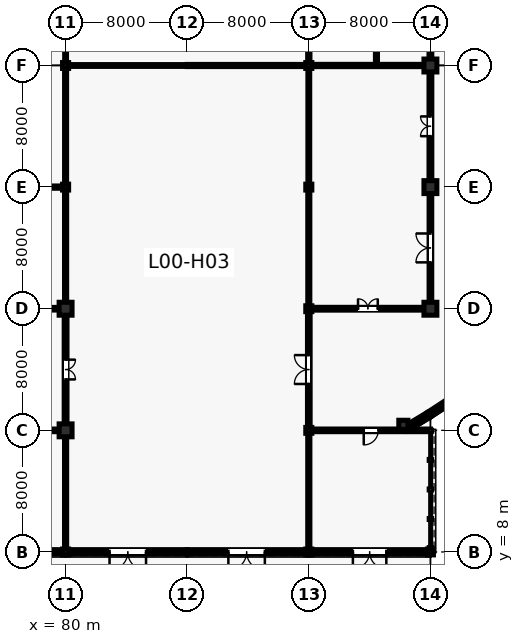
"""IFC4 building model, lengths in metres.
Left out: names, types, materials, properties, quantities, classifications, styles, units other than length and angle.
Written with IfcOpenShell. Run it as: python <this file> out.ifc"""

import sys

from ifc_helpers import new_model, si_unit, direction, frame, frame_2d, origin, origin_2d, place, context, subcontext, project, spatial, rectangle, i_section, extrude, element, fill, save


model = new_model("IFC4")
c1 = context("Model", 3, precision=1e-05, world=origin(), true_north=direction((0.0, 1.0)))
c2 = subcontext(c1, "Body", "Model", "MODEL_VIEW")
j1 = project(units=[si_unit("LENGTHUNIT", "METRE"), si_unit("PLANEANGLEUNIT", "RADIAN")], contexts=[c1])
p1 = place(None, origin())
s1 = spatial("IfcSite", under=j1, at=p1, CompositionType="ELEMENT")
p2 = place(p1, origin())
s2 = spatial("IfcBuilding", under=s1, at=p2, CompositionType="ELEMENT")
p3 = place(p2, origin())
s3 = spatial("IfcBuildingStorey", under=s2, at=p3, CompositionType="ELEMENT", Elevation=0.0)
p4 = place(p3, frame((80.0, 8.0, 0.0), z_axis=(0.0, 0.0, 1.0), x_axis=(1.0, 0.0, 0.0)))
e1 = element("IfcColumn", 1, at=p4, inside=s3, PredefinedType="COLUMN", context=c2, shape_type="SweptSolid", body=[
    extrude(i_section(OverallWidth=0.398, OverallDepth=0.387, WebThickness=0.021, FlangeThickness=0.033, FilletRadius=0.015, at=origin_2d()), origin(), (0.0, 0.0, 1.0), 5.28),
])
for number, where, z_axis, x_axis in (
    (2, (80.0, 16.0, 0.0), (0.0, 0.0, 1.0), (1.0, 0.0, 0.0)),
    (3, (80.0, 24.0, 0.0), (0.0, 0.0, 1.0), (1.0, 0.0, 0.0)),
):
    element("IfcColumn", number, at=place(p3, frame(where, z_axis=z_axis, x_axis=x_axis)), inside=s3, PredefinedType="COLUMN", context=c2, shape_type="SweptSolid", body=[
        extrude(rectangle(XDim=0.85, YDim=0.85, at=origin_2d()), origin(), (0.0, 0.0, 1.0), 5.28),
    ])
for number, where, z_axis, x_axis in (
    (4, (80.0, 32.0, 0.0), (0.0, 0.0, 1.0), (1.0, 0.0, 0.0)),
    (5, (80.0, 40.0, 0.0), (0.0, 0.0, 1.0), (1.0, 0.0, 0.0)),
    (6, (96.0, 8.0, 0.0), (0.0, 0.0, 1.0), (1.0, 0.0, 0.0)),
    (7, (96.0, 16.0, 0.0), (0.0, 0.0, 1.0), (1.0, 0.0, 0.0)),
    (8, (96.0, 24.0, 0.0), (0.0, 0.0, 1.0), (1.0, 0.0, 0.0)),
    (9, (96.0, 32.0, 0.0), (0.0, 0.0, 1.0), (1.0, 0.0, 0.0)),
    (10, (96.0, 40.0, 0.0), (0.0, 0.0, 1.0), (1.0, 0.0, 0.0)),
    (11, (104.0, 8.0, 0.0), (0.0, 0.0, 1.0), (1.0, 0.0, 0.0)),
):
    element("IfcColumn", number, at=place(p3, frame(where, z_axis=z_axis, x_axis=x_axis)), inside=s3, PredefinedType="COLUMN", context=c2, shape_type="SweptSolid", body=[
        extrude(i_section(OverallWidth=0.398, OverallDepth=0.387, WebThickness=0.021, FlangeThickness=0.033, FilletRadius=0.015, at=origin_2d()), origin(), (0.0, 0.0, 1.0), 5.28),
    ])
for number, where, z_axis, x_axis in (
    (12, (104.0, 24.0, 0.0), (0.0, 0.0, 1.0), (1.0, 0.0, 0.0)),
    (13, (104.0, 32.0, 0.0), (0.0, 0.0, 1.0), (1.0, 0.0, 0.0)),
    (14, (104.0, 40.0, 0.0), (0.0, 0.0, 1.0), (1.0, 0.0, 0.0)),
):
    element("IfcColumn", number, at=place(p3, frame(where, z_axis=z_axis, x_axis=x_axis)), inside=s3, PredefinedType="COLUMN", context=c2, shape_type="SweptSolid", body=[
        extrude(rectangle(XDim=0.85, YDim=0.85, at=origin_2d()), origin(), (0.0, 0.0, 1.0), 5.28),
    ])
p5 = place(p3, frame((102.221, 16.364, 0.0), z_axis=(0.0, 0.0, 1.0), x_axis=(1.0, 0.0, 0.0)))
e15 = element("IfcColumn", 15, at=p5, inside=s3, PredefinedType="COLUMN", context=c2, shape_type="SweptSolid", body=[
    extrude(rectangle(XDim=0.6, YDim=0.6, at=origin_2d()), origin(), (0.0, 0.0, 1.0), 5.28),
])
p6 = place(p3, frame((102.351, 16.133, 0.0), z_axis=(0.0, 0.0, 1.0), x_axis=(0.856543302071, 0.51607516088, 0.0)))
e16 = element("IfcWall", 16, at=p6, inside=s3, PredefinedType="SOLIDWALL", context=c2, shape_type="SweptSolid", body=[
    extrude(rectangle(XDim=1.795, YDim=0.305, at=frame_2d((0.897, 0.0))), origin(), (0.0, 0.0, 1.0), 5.035),
])
p7 = place(p3, frame((103.883, 17.056, 0.0), z_axis=(0.0, 0.0, 1.0), x_axis=(0.836686786408, 0.547681678944, 0.0)))
e17 = element("IfcWall", 17, at=p7, inside=s3, PredefinedType="SOLIDWALL", context=c2, shape_type="SweptSolid", body=[
    extrude(rectangle(XDim=1.795, YDim=0.305, at=frame_2d((0.897, 0.0))), origin(), (0.0, 0.0, 1.0), 5.035),
])
p8 = place(p7, frame((0.347, 0.0, 0.9)))
e18 = element("IfcOpeningElement", 18, at=p8, cuts=e17, PredefinedType="OPENING", context=c2, shape_type="SweptSolid", body=[
    extrude(rectangle(XDim=1.1, YDim=2.1, at=frame_2d((0.55, 1.05))), frame((0.0, 0.162, 0.0), z_axis=(0.0, -1.0, 0.0), x_axis=(1.0, 0.0, 0.0)), (0.0, 0.0, 1.0), 0.325),
])
p9 = place(p3, frame((72.184, 8.0, 0.0), z_axis=(0.0, 0.0, 1.0), x_axis=(1.0, 0.0, 0.0)))
e19 = element("IfcWall", 19, at=p9, inside=s3, PredefinedType="SOLIDWALL", context=c2, shape_type="SweptSolid", body=[
    extrude(rectangle(XDim=7.632, YDim=0.305, at=frame_2d((3.816, 0.0))), origin(), (0.0, 0.0, 1.0), 4.619),
])
p10 = place(p9, frame((2.716, 0.0, 0.0)))
e20 = element("IfcOpeningElement", 20, at=p10, cuts=e19, PredefinedType="OPENING", context=c2, shape_type="SweptSolid", body=[
    extrude(rectangle(XDim=2.2, YDim=2.5, at=frame_2d((1.1, 1.25))), frame((0.0, 0.162, 0.0), z_axis=(0.0, -1.0, 0.0), x_axis=(1.0, 0.0, 0.0)), (0.0, 0.0, 1.0), 0.325),
])
p11 = place(p3, frame((80.184, 8.0, 0.0), z_axis=(0.0, 0.0, 1.0), x_axis=(1.0, 0.0, 0.0)))
e21 = element("IfcWall", 21, at=p11, inside=s3, PredefinedType="SOLIDWALL", context=c2, shape_type="SweptSolid", body=[
    extrude(rectangle(XDim=7.816, YDim=0.305, at=frame_2d((3.908, 0.0))), origin(), (0.0, 0.0, 1.0), 4.274),
])
p12 = place(p11, frame((2.708, 0.0, 0.0)))
e22 = element("IfcOpeningElement", 22, at=p12, cuts=e21, PredefinedType="OPENING", context=c2, shape_type="SweptSolid", body=[
    extrude(rectangle(XDim=2.4, YDim=2.7, at=frame_2d((1.2, 1.35))), frame((0.0, 0.162, 0.0), z_axis=(0.0, -1.0, 0.0), x_axis=(1.0, 0.0, 0.0)), (0.0, 0.0, 1.0), 0.325),
])
p13 = place(p3, frame((88.0, 8.0, 0.0), z_axis=(0.0, 0.0, 1.0), x_axis=(1.0, 0.0, 0.0)))
e23 = element("IfcWall", 23, at=p13, inside=s3, PredefinedType="SOLIDWALL", context=c2, shape_type="SweptSolid", body=[
    extrude(rectangle(XDim=7.816, YDim=0.305, at=frame_2d((3.908, 0.0))), origin(), (0.0, 0.0, 1.0), 4.274),
])
p14 = place(p13, frame((2.708, 0.0, 0.0)))
e24 = element("IfcOpeningElement", 24, at=p14, cuts=e23, PredefinedType="OPENING", context=c2, shape_type="SweptSolid", body=[
    extrude(rectangle(XDim=2.4, YDim=2.7, at=frame_2d((1.2, 1.35))), frame((0.0, 0.162, 0.0), z_axis=(0.0, -1.0, 0.0), x_axis=(1.0, 0.0, 0.0)), (0.0, 0.0, 1.0), 0.325),
])
p15 = place(p3, frame((96.184, 8.0, 0.0), z_axis=(0.0, 0.0, 1.0), x_axis=(1.0, 0.0, 0.0)))
e25 = element("IfcWall", 25, at=p15, inside=s3, PredefinedType="SOLIDWALL", context=c2, shape_type="SweptSolid", body=[
    extrude(rectangle(XDim=7.632, YDim=0.305, at=frame_2d((3.816, 0.0))), origin(), (0.0, 0.0, 1.0), 4.679),
])
p16 = place(p15, frame((2.716, 0.0, 0.0)))
e26 = element("IfcOpeningElement", 26, at=p16, cuts=e25, PredefinedType="OPENING", context=c2, shape_type="SweptSolid", body=[
    extrude(rectangle(XDim=2.2, YDim=2.5, at=frame_2d((1.1, 1.25))), frame((0.0, 0.162, 0.0), z_axis=(0.0, -1.0, 0.0), x_axis=(1.0, 0.0, 0.0)), (0.0, 0.0, 1.0), 0.325),
])
p17 = place(p3, frame((80.0, 8.184, 0.0), z_axis=(0.0, 0.0, 1.0), x_axis=(0.0, 1.0, 0.0)))
e27 = element("IfcWall", 27, at=p17, inside=s3, PredefinedType="PARTITIONING", context=c2, shape_type="SweptSolid", body=[
    extrude(rectangle(XDim=7.401, YDim=0.142, at=frame_2d((3.701, 0.0))), origin(), (0.0, 0.0, 1.0), 5.025),
])
p18 = place(p3, frame((72.0, 16.0, 0.0), z_axis=(0.0, 0.0, 1.0), x_axis=(1.0, 0.0, 0.0)))
e28 = element("IfcWall", 28, at=p18, inside=s3, PredefinedType="PARTITIONING", context=c2, shape_type="SweptSolid", body=[
    extrude(rectangle(XDim=7.585, YDim=0.175, at=frame_2d((3.792, 0.0))), origin(), (0.0, 0.0, 1.0), 5.025),
])
p19 = place(p18, frame((3.268, 0.0, 0.0)))
e29 = element("IfcOpeningElement", 29, at=p19, cuts=e28, PredefinedType="OPENING", context=c2, shape_type="SweptSolid", body=[
    extrude(rectangle(XDim=1.05, YDim=2.15, at=frame_2d((0.525, 1.075))), frame((0.0, 0.097, 0.0), z_axis=(0.0, -1.0, 0.0), x_axis=(1.0, 0.0, 0.0)), (0.0, 0.0, 1.0), 0.195),
])
p20 = place(p3, frame((80.0, 16.415, 0.0), z_axis=(0.0, 0.0, 1.0), x_axis=(0.0, 1.0, 0.0)))
e30 = element("IfcWall", 30, at=p20, inside=s3, PredefinedType="PARTITIONING", context=c2, shape_type="SweptSolid", body=[
    extrude(rectangle(XDim=7.17, YDim=0.185, at=frame_2d((3.585, 0.0))), origin(), (0.0, 0.0, 1.0), 4.603),
])
p21 = place(p20, frame((2.935, 0.0, 0.0)))
e31 = element("IfcOpeningElement", 31, at=p21, cuts=e30, PredefinedType="OPENING", context=c2, shape_type="SweptSolid", body=[
    extrude(rectangle(XDim=1.3, YDim=2.2, at=frame_2d((0.65, 1.1))), frame((0.0, 0.103, 0.0), z_axis=(0.0, -1.0, 0.0), x_axis=(1.0, 0.0, 0.0)), (0.0, 0.0, 1.0), 0.205),
])
p22 = place(p3, frame((72.415, 24.0, 0.0), z_axis=(0.0, 0.0, 1.0), x_axis=(1.0, 0.0, 0.0)))
e32 = element("IfcWall", 32, at=p22, inside=s3, PredefinedType="PARTITIONING", context=c2, shape_type="SweptSolid", body=[
    extrude(rectangle(XDim=7.17, YDim=0.175, at=frame_2d((3.585, 0.0))), origin(), (0.0, 0.0, 1.0), 4.327),
])
p23 = place(p3, frame((80.0, 24.415, 0.0), z_axis=(0.0, 0.0, 1.0), x_axis=(0.0, 1.0, 0.0)))
e33 = element("IfcWall", 33, at=p23, inside=s3, PredefinedType="PARTITIONING", context=c2, shape_type="SweptSolid", body=[
    extrude(rectangle(XDim=7.401, YDim=0.142, at=frame_2d((3.701, 0.0))), origin(), (0.0, 0.0, 1.0), 4.667),
])
p24 = place(p3, frame((72.415, 32.0, 0.0), z_axis=(0.0, 0.0, 1.0), x_axis=(1.0, 0.0, 0.0)))
e34 = element("IfcWall", 34, at=p24, inside=s3, PredefinedType="PARTITIONING", context=c2, shape_type="SweptSolid", body=[
    extrude(rectangle(XDim=7.396, YDim=0.15, at=frame_2d((3.698, 0.0))), origin(), (0.0, 0.0, 1.0), 4.403),
])
p25 = place(p3, frame((80.0, 32.184, 0.0), z_axis=(0.0, 0.0, 1.0), x_axis=(0.0, 1.0, 0.0)))
e35 = element("IfcWall", 35, at=p25, inside=s3, PredefinedType="PARTITIONING", context=c2, shape_type="SweptSolid", body=[
    extrude(rectangle(XDim=7.633, YDim=0.135, at=frame_2d((3.816, 0.0))), origin(), (0.0, 0.0, 1.0), 4.607),
])
p26 = place(p3, frame((80.0, 40.184, 0.0), z_axis=(0.0, 0.0, 1.0), x_axis=(0.0, 1.0, 0.0)))
e36 = element("IfcWall", 36, at=p26, inside=s3, PredefinedType="PARTITIONING", context=c2, shape_type="SweptSolid", body=[
    extrude(rectangle(XDim=7.633, YDim=0.12, at=frame_2d((3.816, 0.0))), origin(), (0.0, 0.0, 1.0), 4.471),
])
p27 = place(p3, frame((80.189, 40.0, 0.0), z_axis=(0.0, 0.0, 1.0), x_axis=(1.0, 0.0, 0.0)))
e37 = element("IfcWall", 37, at=p27, inside=s3, PredefinedType="PARTITIONING", context=c2, shape_type="SweptSolid", body=[
    extrude(rectangle(XDim=7.811, YDim=0.12, at=frame_2d((3.906, 0.0))), origin(), (0.0, 0.0, 1.0), 4.262),
])
p28 = place(p3, frame((96.0, 8.184, 0.0), z_axis=(0.0, 0.0, 1.0), x_axis=(0.0, 1.0, 0.0)))
e38 = element("IfcWall", 38, at=p28, inside=s3, PredefinedType="PARTITIONING", context=c2, shape_type="SweptSolid", body=[
    extrude(rectangle(XDim=7.633, YDim=0.142, at=frame_2d((3.816, 0.0))), origin(), (0.0, 0.0, 1.0), 5.025),
])
p29 = place(p3, frame((96.0, 16.184, 0.0), z_axis=(0.0, 0.0, 1.0), x_axis=(0.0, 1.0, 0.0)))
e39 = element("IfcWall", 39, at=p29, inside=s3, PredefinedType="PARTITIONING", context=c2, shape_type="SweptSolid", body=[
    extrude(rectangle(XDim=7.633, YDim=0.175, at=frame_2d((3.816, 0.0))), origin(), (0.0, 0.0, 1.0), 4.607),
])
p30 = place(p29, frame((2.866, 0.0, 0.0)))
e40 = element("IfcOpeningElement", 40, at=p30, cuts=e39, PredefinedType="OPENING", context=c2, shape_type="SweptSolid", body=[
    extrude(rectangle(XDim=1.9, YDim=2.38, at=frame_2d((0.95, 1.19))), frame((0.0, 0.097, 0.0), z_axis=(0.0, -1.0, 0.0), x_axis=(1.0, 0.0, 0.0)), (0.0, 0.0, 1.0), 0.195),
])
p31 = place(p3, frame((96.0, 24.184, 0.0), z_axis=(0.0, 0.0, 1.0), x_axis=(0.0, 1.0, 0.0)))
e41 = element("IfcWall", 41, at=p31, inside=s3, PredefinedType="PARTITIONING", context=c2, shape_type="SweptSolid", body=[
    extrude(rectangle(XDim=7.633, YDim=0.135, at=frame_2d((3.816, 0.0))), origin(), (0.0, 0.0, 1.0), 4.67),
])
p32 = place(p3, frame((96.0, 32.184, 0.0), z_axis=(0.0, 0.0, 1.0), x_axis=(0.0, 1.0, 0.0)))
e42 = element("IfcWall", 42, at=p32, inside=s3, PredefinedType="PARTITIONING", context=c2, shape_type="SweptSolid", body=[
    extrude(rectangle(XDim=7.633, YDim=0.12, at=frame_2d((3.816, 0.0))), origin(), (0.0, 0.0, 1.0), 4.603),
])
p33 = place(p3, frame((88.0, 40.0, 0.0), z_axis=(0.0, 0.0, 1.0), x_axis=(1.0, 0.0, 0.0)))
e43 = element("IfcWall", 43, at=p33, inside=s3, PredefinedType="PARTITIONING", context=c2, shape_type="SweptSolid", body=[
    extrude(rectangle(XDim=7.811, YDim=0.142, at=frame_2d((3.906, 0.0))), origin(), (0.0, 0.0, 1.0), 4.262),
])
p34 = place(p3, frame((96.0, 40.184, 0.0), z_axis=(0.0, 0.0, 1.0), x_axis=(0.0, 1.0, 0.0)))
e44 = element("IfcWall", 44, at=p34, inside=s3, PredefinedType="PARTITIONING", context=c2, shape_type="SweptSolid", body=[
    extrude(rectangle(XDim=7.633, YDim=0.15, at=frame_2d((3.816, 0.0))), origin(), (0.0, 0.0, 1.0), 4.412),
])
p35 = place(p3, frame((96.189, 16.0, 0.0), z_axis=(0.0, 0.0, 1.0), x_axis=(1.0, 0.0, 0.0)))
e45 = element("IfcWall", 45, at=p35, inside=s3, PredefinedType="PARTITIONING", context=c2, shape_type="SweptSolid", body=[
    extrude(rectangle(XDim=7.811, YDim=0.175, at=frame_2d((3.906, 0.0))), origin(), (0.0, 0.0, 1.0), 5.025),
])
p36 = place(p35, frame((3.426, 0.0, 0.0)))
e46 = element("IfcOpeningElement", 46, at=p36, cuts=e45, PredefinedType="OPENING", context=c2, shape_type="SweptSolid", body=[
    extrude(rectangle(XDim=0.96, YDim=2.14, at=frame_2d((0.48, 1.07))), frame((0.0, 0.097, 0.0), z_axis=(0.0, -1.0, 0.0), x_axis=(1.0, 0.0, 0.0)), (0.0, 0.0, 1.0), 0.195),
])
p37 = place(p3, frame((96.189, 24.0, 0.0), z_axis=(0.0, 0.0, 1.0), x_axis=(1.0, 0.0, 0.0)))
e47 = element("IfcWall", 47, at=p37, inside=s3, PredefinedType="PARTITIONING", context=c2, shape_type="SweptSolid", body=[
    extrude(rectangle(XDim=7.396, YDim=0.185, at=frame_2d((3.698, 0.0))), origin(), (0.0, 0.0, 1.0), 4.404),
])
p38 = place(p37, frame((3.048, 0.0, 0.0)))
e48 = element("IfcOpeningElement", 48, at=p38, cuts=e47, PredefinedType="OPENING", context=c2, shape_type="SweptSolid", body=[
    extrude(rectangle(XDim=1.3, YDim=2.2, at=frame_2d((0.65, 1.1))), frame((0.0, 0.103, 0.0), z_axis=(0.0, -1.0, 0.0), x_axis=(1.0, 0.0, 0.0)), (0.0, 0.0, 1.0), 0.205),
])
p39 = place(p3, frame((104.0, 24.415, 0.0), z_axis=(0.0, 0.0, 1.0), x_axis=(0.0, 1.0, 0.0)))
e49 = element("IfcWall", 49, at=p39, inside=s3, PredefinedType="PARTITIONING", context=c2, shape_type="SweptSolid", body=[
    extrude(rectangle(XDim=7.17, YDim=0.175, at=frame_2d((3.585, 0.0))), origin(), (0.0, 0.0, 1.0), 4.403),
])
p40 = place(p39, frame((2.635, 0.0, 0.0)))
e50 = element("IfcOpeningElement", 50, at=p40, cuts=e49, PredefinedType="OPENING", context=c2, shape_type="SweptSolid", body=[
    extrude(rectangle(XDim=1.9, YDim=2.38, at=frame_2d((0.95, 1.19))), frame((0.0, 0.097, 0.0), z_axis=(0.0, -1.0, 0.0), x_axis=(1.0, 0.0, 0.0)), (0.0, 0.0, 1.0), 0.195),
])
p41 = place(p3, frame((104.0, 32.415, 0.0), z_axis=(0.0, 0.0, 1.0), x_axis=(0.0, 1.0, 0.0)))
e51 = element("IfcWall", 51, at=p41, inside=s3, PredefinedType="PARTITIONING", context=c2, shape_type="SweptSolid", body=[
    extrude(rectangle(XDim=7.17, YDim=0.185, at=frame_2d((3.585, 0.0))), origin(), (0.0, 0.0, 1.0), 4.412),
])
p42 = place(p41, frame((2.935, 0.0, 0.0)))
e52 = element("IfcOpeningElement", 52, at=p42, cuts=e51, PredefinedType="OPENING", context=c2, shape_type="SweptSolid", body=[
    extrude(rectangle(XDim=1.3, YDim=2.2, at=frame_2d((0.65, 1.1))), frame((0.0, 0.103, 0.0), z_axis=(0.0, -1.0, 0.0), x_axis=(1.0, 0.0, 0.0)), (0.0, 0.0, 1.0), 0.205),
])
p43 = place(p3, frame((96.189, 40.0, 0.0), z_axis=(0.0, 0.0, 1.0), x_axis=(1.0, 0.0, 0.0)))
e53 = element("IfcWall", 53, at=p43, inside=s3, PredefinedType="PARTITIONING", context=c2, shape_type="SweptSolid", body=[
    extrude(rectangle(XDim=7.396, YDim=0.15, at=frame_2d((3.698, 0.0))), origin(), (0.0, 0.0, 1.0), 4.403),
])
p44 = place(p3, frame((104.0, 40.415, 0.0), z_axis=(0.0, 0.0, 1.0), x_axis=(0.0, 1.0, 0.0)))
e54 = element("IfcWall", 54, at=p44, inside=s3, PredefinedType="PARTITIONING", context=c2, shape_type="SweptSolid", body=[
    extrude(rectangle(XDim=7.17, YDim=0.185, at=frame_2d((3.585, 0.0))), origin(), (0.0, 0.0, 1.0), 4.404),
])
p45 = place(p44, frame((3.085, 0.0, 0.0)))
e55 = element("IfcOpeningElement", 55, at=p45, cuts=e54, PredefinedType="OPENING", context=c2, shape_type="SweptSolid", body=[
    extrude(rectangle(XDim=1.0, YDim=2.15, at=frame_2d((0.5, 1.075))), frame((0.0, 0.103, 0.0), z_axis=(0.0, -1.0, 0.0), x_axis=(1.0, 0.0, 0.0)), (0.0, 0.0, 1.0), 0.205),
])
p46 = place(p3, frame((100.45, 40.02, 0.0), z_axis=(0.0, 0.0, 1.0), x_axis=(0.0, 1.0, 0.0)))
e56 = element("IfcWall", 56, at=p46, inside=s3, PredefinedType="PARTITIONING", context=c2, shape_type="SweptSolid", body=[
    extrude(rectangle(XDim=7.96, YDim=0.135, at=frame_2d((3.98, 0.0))), origin(), (0.0, 0.0, 1.0), 4.336),
])
p47 = place(p46, frame((3.49, 0.0, 0.0)))
e57 = element("IfcOpeningElement", 57, at=p47, cuts=e56, PredefinedType="OPENING", context=c2, shape_type="SweptSolid", body=[
    extrude(rectangle(XDim=0.98, YDim=2.15, at=frame_2d((0.49, 1.075))), frame((0.0, 0.077, 0.0), z_axis=(0.0, -1.0, 0.0), x_axis=(1.0, 0.0, 0.0)), (0.0, 0.0, 1.0), 0.155),
])
p48 = place(p8, origin())
e58 = element("IfcWindow", 58, at=p48, inside=s3, PartitioningType="SINGLE_PANEL", PredefinedType="WINDOW", context=c2, shape_type="SweptSolid", body=[
    extrude(rectangle(XDim=1.1, YDim=2.1, at=frame_2d((0.55, 1.05))), frame((0.0, 0.03, 0.0), z_axis=(0.0, -1.0, 0.0), x_axis=(1.0, 0.0, 0.0)), (0.0, 0.0, 1.0), 0.06),
])
fill(e18, e58)
p49 = place(p12, frame((2.4, 0.0, 0.0), z_axis=(0.0, 0.0, 1.0), x_axis=(-1.0, 0.0, 0.0)))
e59 = element("IfcDoor", 59, at=p49, inside=s3, OperationType="DOUBLE_DOOR_SINGLE_SWING", PredefinedType="DOOR", context=c2, shape_type="SweptSolid", body=[
    extrude(rectangle(XDim=2.4, YDim=2.7, at=frame_2d((1.2, 1.35))), frame((0.0, 0.025, 0.0), z_axis=(0.0, -1.0, 0.0), x_axis=(1.0, 0.0, 0.0)), (0.0, 0.0, 1.0), 0.05),
])
fill(e22, e59)
p50 = place(p14, frame((2.4, 0.0, 0.0), z_axis=(0.0, 0.0, 1.0), x_axis=(-1.0, 0.0, 0.0)))
e60 = element("IfcDoor", 60, at=p50, inside=s3, OperationType="DOUBLE_DOOR_SINGLE_SWING", PredefinedType="DOOR", context=c2, shape_type="SweptSolid", body=[
    extrude(rectangle(XDim=2.4, YDim=2.7, at=frame_2d((1.2, 1.35))), frame((0.0, 0.025, 0.0), z_axis=(0.0, -1.0, 0.0), x_axis=(1.0, 0.0, 0.0)), (0.0, 0.0, 1.0), 0.05),
])
fill(e24, e60)
p51 = place(p16, frame((2.2, 0.0, 0.0), z_axis=(0.0, 0.0, 1.0), x_axis=(-1.0, 0.0, 0.0)))
e61 = element("IfcDoor", 61, at=p51, inside=s3, OperationType="DOUBLE_DOOR_SINGLE_SWING", PredefinedType="DOOR", context=c2, shape_type="SweptSolid", body=[
    extrude(rectangle(XDim=2.2, YDim=2.5, at=frame_2d((1.1, 1.25))), frame((0.0, 0.025, 0.0), z_axis=(0.0, -1.0, 0.0), x_axis=(1.0, 0.0, 0.0)), (0.0, 0.0, 1.0), 0.05),
])
fill(e26, e61)
p52 = place(p21, frame((1.3, 0.0, 0.0), z_axis=(0.0, 0.0, 1.0), x_axis=(-1.0, 0.0, 0.0)))
e62 = element("IfcDoor", 62, at=p52, inside=s3, OperationType="DOUBLE_DOOR_SINGLE_SWING", PredefinedType="DOOR", context=c2, shape_type="SweptSolid", body=[
    extrude(rectangle(XDim=1.3, YDim=2.2, at=frame_2d((0.65, 1.1))), frame((0.0, 0.025, 0.0), z_axis=(0.0, -1.0, 0.0), x_axis=(1.0, 0.0, 0.0)), (0.0, 0.0, 1.0), 0.05),
])
fill(e31, e62)
p53 = place(p30, origin())
e63 = element("IfcDoor", 63, at=p53, inside=s3, OperationType="DOUBLE_DOOR_SINGLE_SWING", PredefinedType="DOOR", context=c2, shape_type="SweptSolid", body=[
    extrude(rectangle(XDim=1.9, YDim=2.38, at=frame_2d((0.95, 1.19))), frame((0.0, 0.025, 0.0), z_axis=(0.0, -1.0, 0.0), x_axis=(1.0, 0.0, 0.0)), (0.0, 0.0, 1.0), 0.05),
])
fill(e40, e63)
p54 = place(p36, frame((0.96, 0.0, 0.0), z_axis=(0.0, 0.0, 1.0), x_axis=(-1.0, 0.0, 0.0)))
e64 = element("IfcDoor", 64, at=p54, inside=s3, OperationType="SINGLE_SWING_LEFT", PredefinedType="DOOR", context=c2, shape_type="SweptSolid", body=[
    extrude(rectangle(XDim=0.96, YDim=2.14, at=frame_2d((0.48, 1.07))), frame((0.0, 0.025, 0.0), z_axis=(0.0, -1.0, 0.0), x_axis=(1.0, 0.0, 0.0)), (0.0, 0.0, 1.0), 0.05),
])
fill(e46, e64)
p55 = place(p38, origin())
e65 = element("IfcDoor", 65, at=p55, inside=s3, OperationType="DOUBLE_DOOR_SINGLE_SWING", PredefinedType="DOOR", context=c2, shape_type="SweptSolid", body=[
    extrude(rectangle(XDim=1.3, YDim=2.2, at=frame_2d((0.65, 1.1))), frame((0.0, 0.025, 0.0), z_axis=(0.0, -1.0, 0.0), x_axis=(1.0, 0.0, 0.0)), (0.0, 0.0, 1.0), 0.05),
])
fill(e48, e65)
p56 = place(p40, origin())
e66 = element("IfcDoor", 66, at=p56, inside=s3, OperationType="DOUBLE_DOOR_SINGLE_SWING", PredefinedType="DOOR", context=c2, shape_type="SweptSolid", body=[
    extrude(rectangle(XDim=1.9, YDim=2.38, at=frame_2d((0.95, 1.19))), frame((0.0, 0.025, 0.0), z_axis=(0.0, -1.0, 0.0), x_axis=(1.0, 0.0, 0.0)), (0.0, 0.0, 1.0), 0.05),
])
fill(e50, e66)
p57 = place(p42, origin())
e67 = element("IfcDoor", 67, at=p57, inside=s3, OperationType="DOUBLE_DOOR_SINGLE_SWING", PredefinedType="DOOR", context=c2, shape_type="SweptSolid", body=[
    extrude(rectangle(XDim=1.3, YDim=2.2, at=frame_2d((0.65, 1.1))), frame((0.0, 0.025, 0.0), z_axis=(0.0, -1.0, 0.0), x_axis=(1.0, 0.0, 0.0)), (0.0, 0.0, 1.0), 0.05),
])
fill(e52, e67)
save(model, sys.argv[1])
